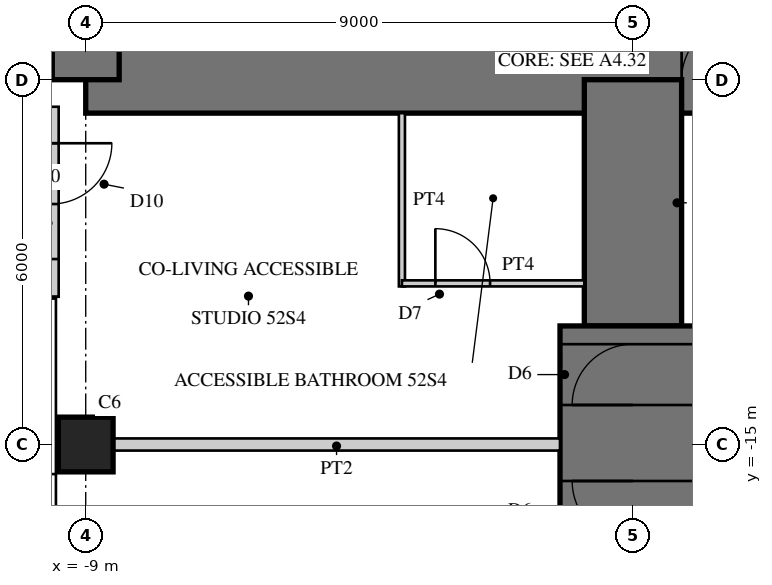
"""IFC4 building model, lengths in metres.
Left out: names, types, materials, properties, quantities, classifications, styles, units other than length and angle.
Written with IfcOpenShell. Run it as: python <this file> out.ifc"""

import sys

from ifc_helpers import new_model, si_unit, direction, frame, frame_2d, origin, origin_2d, place, context, subcontext, project, spatial, rectangle, hollow_rectangle, extrude, element, fill, save


model = new_model("IFC4")
c1 = context("Model", 3, precision=1e-05, world=origin(), true_north=direction((0.0, 1.0)))
c2 = subcontext(c1, "Body", "Model", "MODEL_VIEW")
j1 = project(units=[si_unit("LENGTHUNIT", "METRE"), si_unit("PLANEANGLEUNIT", "RADIAN")], contexts=[c1])
p1 = place(None, origin())
s1 = spatial("IfcSite", under=j1, at=p1, CompositionType="ELEMENT")
p2 = place(p1, origin())
s2 = spatial("IfcBuilding", under=s1, at=p2, CompositionType="ELEMENT")
p3 = place(p2, frame((0.0, 0.0, 206.9)))
s3 = spatial("IfcBuildingStorey", under=s2, at=p3, CompositionType="ELEMENT", Elevation=206.9)
p4 = place(p3, frame((-9.0, -9.0, 0.0), z_axis=(0.0, 0.0, 1.0), x_axis=(1.0, 0.0, 0.0)))
e1 = element("IfcWall", 1, at=p4, inside=s3, PredefinedType="SHEAR", context=c2, shape_type="SweptSolid", body=[
    extrude(rectangle(XDim=18.0, YDim=1.1, at=frame_2d((9.0, 0.0))), origin(), (0.0, 0.0, 1.0), 3.4),
])
p5 = place(p4, frame((9.8, 0.0, 0.0)))
e2 = element("IfcOpeningElement", 2, at=p5, cuts=e1, PredefinedType="OPENING", context=c2, shape_type="SweptSolid", body=[
    extrude(rectangle(XDim=1.0, YDim=2.4, at=frame_2d((0.5, 1.2))), frame((0.0, 0.56, 0.0), z_axis=(0.0, -1.0, 0.0), x_axis=(1.0, 0.0, 0.0)), (0.0, 0.0, 1.0), 1.12),
])
p6 = place(p3, frame((-9.0, 9.0, 0.0), z_axis=(0.0, 0.0, 1.0), x_axis=(0.0, -1.0, 0.0)))
e3 = element("IfcWall", 3, at=p6, inside=s3, PredefinedType="SHEAR", context=c2, shape_type="SweptSolid", body=[
    extrude(rectangle(XDim=18.0, YDim=1.1, at=frame_2d((9.0, 0.0))), origin(), (0.0, 0.0, 1.0), 3.4),
])
p7 = place(p6, frame((9.8, 0.0, 0.0)))
e4 = element("IfcOpeningElement", 4, at=p7, cuts=e3, PredefinedType="OPENING", context=c2, shape_type="SweptSolid", body=[
    extrude(rectangle(XDim=1.0, YDim=2.4, at=frame_2d((0.5, 1.2))), frame((0.0, 0.56, 0.0), z_axis=(0.0, -1.0, 0.0), x_axis=(1.0, 0.0, 0.0)), (0.0, 0.0, 1.0), 1.12),
])
p8 = place(p3, frame((0.0, -9.0, 0.0), z_axis=(0.0, 0.0, 1.0), x_axis=(0.0, -1.0, 0.0)))
e5 = element("IfcWall", 5, at=p8, inside=s3, PredefinedType="SHEAR", context=c2, shape_type="SweptSolid", body=[
    extrude(rectangle(XDim=4.05, YDim=1.6, at=frame_2d((2.025, 0.0))), origin(), (0.0, 0.0, 1.0), 3.4),
])
p9 = place(p3, frame((0.0, -13.05, 0.0), z_axis=(0.0, 0.0, 1.0), x_axis=(0.0, -1.0, 0.0)))
e6 = element("IfcWall", 6, at=p9, inside=s3, PredefinedType="SHEAR", context=c2, shape_type="SweptSolid", body=[
    extrude(rectangle(XDim=13.95, YDim=2.4, at=frame_2d((6.975, 0.0))), origin(), (0.0, 0.0, 1.0), 3.4),
])
p10 = place(p9, frame((0.3, 0.0, 0.0)))
e7 = element("IfcOpeningElement", 7, at=p10, cuts=e6, PredefinedType="OPENING", context=c2, shape_type="SweptSolid", body=[
    extrude(rectangle(XDim=1.0, YDim=2.15, at=frame_2d((0.5, 1.075))), frame((0.0, 1.21, 0.0), z_axis=(0.0, -1.0, 0.0), x_axis=(1.0, 0.0, 0.0)), (0.0, 0.0, 1.0), 2.42),
])
p11 = place(p9, frame((2.55, 0.0, 0.0)))
e8 = element("IfcOpeningElement", 8, at=p11, cuts=e6, PredefinedType="OPENING", context=c2, shape_type="SweptSolid", body=[
    extrude(rectangle(XDim=1.0, YDim=2.15, at=frame_2d((0.5, 1.075))), frame((0.0, 1.21, 0.0), z_axis=(0.0, -1.0, 0.0), x_axis=(1.0, 0.0, 0.0)), (0.0, 0.0, 1.0), 2.42),
])
p12 = place(p9, frame((9.2, 0.0, 0.0)))
e9 = element("IfcOpeningElement", 9, at=p12, cuts=e6, PredefinedType="OPENING", context=c2, shape_type="SweptSolid", body=[
    extrude(rectangle(XDim=1.0, YDim=2.2, at=frame_2d((0.5, 1.1))), frame((0.0, 1.21, 0.0), z_axis=(0.0, -1.0, 0.0), x_axis=(1.0, 0.0, 0.0)), (0.0, 0.0, 1.0), 2.42),
])
p13 = place(p3, frame((-9.0, -15.0, 0.0), z_axis=(0.0, 0.0, 1.0), x_axis=(1.0, 0.0, 0.0)))
e10 = element("IfcColumn", 10, at=p13, inside=s3, PredefinedType="COLUMN", context=c2, shape_type="SweptSolid", body=[
    extrude(rectangle(XDim=0.9, YDim=0.9, at=origin_2d()), origin(), (0.0, 0.0, 1.0), 3.4),
])
p14 = place(p3, frame((-9.57, -9.445, 0.0), z_axis=(0.0, 0.0, 1.0), x_axis=(0.0, -1.0, 0.0)))
e11 = element("IfcWall", 11, at=p14, inside=s3, PredefinedType="SOLIDWALL", context=c2, shape_type="SweptSolid", body=[
    extrude(rectangle(XDim=3.125, YDim=0.25, at=frame_2d((1.562, 0.0))), origin(), (0.0, 0.0, 1.0), 3.22),
])
p15 = place(p14, frame((0.6, 0.0, 0.0)))
e12 = element("IfcOpeningElement", 12, at=p15, cuts=e11, PredefinedType="OPENING", context=c2, shape_type="SweptSolid", body=[
    extrude(rectangle(XDim=1.0, YDim=2.2, at=frame_2d((0.5, 1.1))), frame((0.0, 0.135, 0.0), z_axis=(0.0, -1.0, 0.0), x_axis=(1.0, 0.0, 0.0)), (0.0, 0.0, 1.0), 0.27),
])
p16 = place(p3, frame((-3.8, -9.55, 0.0), z_axis=(0.0, 0.0, 1.0), x_axis=(0.0, -1.0, 0.0)))
e13 = element("IfcWall", 13, at=p16, inside=s3, PredefinedType="PARTITIONING", context=c2, shape_type="SweptSolid", body=[
    extrude(rectangle(XDim=2.85, YDim=0.1, at=frame_2d((1.425, 0.0))), origin(), (0.0, 0.0, 1.0), 3.22),
])
p17 = place(p3, frame((-3.8, -12.35, 0.0), z_axis=(0.0, 0.0, 1.0), x_axis=(1.0, 0.0, 0.0)))
e14 = element("IfcWall", 14, at=p17, inside=s3, PredefinedType="PARTITIONING", context=c2, shape_type="SweptSolid", body=[
    extrude(rectangle(XDim=3.0, YDim=0.1, at=frame_2d((1.5, 0.0))), origin(), (0.0, 0.0, 1.0), 3.22),
])
p18 = place(p17, frame((0.55, 0.0, 0.0)))
e15 = element("IfcOpeningElement", 15, at=p18, cuts=e14, PredefinedType="OPENING", context=c2, shape_type="SweptSolid", body=[
    extrude(rectangle(XDim=0.9, YDim=2.1, at=frame_2d((0.45, 1.05))), frame((0.0, 0.06, 0.0), z_axis=(0.0, -1.0, 0.0), x_axis=(1.0, 0.0, 0.0)), (0.0, 0.0, 1.0), 0.12),
])
p19 = place(p3, frame((-8.55, -15.0, 0.0), z_axis=(0.0, 0.0, 1.0), x_axis=(1.0, 0.0, 0.0)))
e16 = element("IfcWall", 16, at=p19, inside=s3, PredefinedType="SOLIDWALL", context=c2, shape_type="SweptSolid", body=[
    extrude(rectangle(XDim=7.35, YDim=0.2, at=frame_2d((3.675, 0.0))), origin(), (0.0, 0.0, 1.0), 2.47),
])
p20 = place(p15, origin())
e17 = element("IfcDoor", 17, at=p20, inside=s3, OperationType="SINGLE_SWING_LEFT", PredefinedType="DOOR", context=c2, shape_type="SweptSolid", body=[
    extrude(hollow_rectangle(XDim=1.0, YDim=2.2, WallThickness=0.06, at=frame_2d((0.5, 1.1))), frame((0.0, 0.025, 0.0), z_axis=(0.0, -1.0, 0.0), x_axis=(1.0, 0.0, 0.0)), (0.0, 0.0, 1.0), 0.05),
    extrude(rectangle(XDim=0.879, YDim=2.079, at=frame_2d((0.5, 1.1))), frame((0.0, 0.025, 0.0), z_axis=(0.0, -1.0, 0.0), x_axis=(1.0, 0.0, 0.0)), (0.0, 0.0, 1.0), 0.05),
])
fill(e12, e17)
p21 = place(p18, origin())
e18 = element("IfcDoor", 18, at=p21, inside=s3, OperationType="SINGLE_SWING_LEFT", PredefinedType="DOOR", context=c2, shape_type="SweptSolid", body=[
    extrude(rectangle(XDim=0.9, YDim=2.1, at=frame_2d((0.45, 1.05))), frame((0.0, 0.025, 0.0), z_axis=(0.0, -1.0, 0.0), x_axis=(1.0, 0.0, 0.0)), (0.0, 0.0, 1.0), 0.05),
])
fill(e15, e18)
p22 = place(p10, frame((1.0, 0.0, 0.0), z_axis=(0.0, 0.0, 1.0), x_axis=(-1.0, 0.0, 0.0)))
e19 = element("IfcDoor", 19, at=p22, inside=s3, OperationType="SINGLE_SWING_LEFT", PredefinedType="DOOR", context=c2, shape_type="SweptSolid", body=[
    extrude(rectangle(XDim=1.0, YDim=2.15, at=frame_2d((0.5, 1.075))), frame((0.0, 0.025, 0.0), z_axis=(0.0, -1.0, 0.0), x_axis=(1.0, 0.0, 0.0)), (0.0, 0.0, 1.0), 0.05),
])
fill(e7, e19)
p23 = place(p11, frame((1.0, 0.0, 0.0), z_axis=(0.0, 0.0, 1.0), x_axis=(-1.0, 0.0, 0.0)))
e20 = element("IfcDoor", 20, at=p23, inside=s3, OperationType="SINGLE_SWING_RIGHT", PredefinedType="DOOR", context=c2, shape_type="SweptSolid", body=[
    extrude(rectangle(XDim=1.0, YDim=2.15, at=frame_2d((0.5, 1.075))), frame((0.0, 0.025, 0.0), z_axis=(0.0, -1.0, 0.0), x_axis=(1.0, 0.0, 0.0)), (0.0, 0.0, 1.0), 0.05),
])
fill(e8, e20)
p24 = place(p5, origin())
e21 = element("IfcDoor", 21, at=p24, inside=s3, OperationType="SINGLE_SWING_RIGHT", PredefinedType="DOOR", context=c2, shape_type="SweptSolid", body=[
    extrude(rectangle(XDim=1.0, YDim=2.4, at=frame_2d((0.5, 1.2))), frame((0.0, 0.055, 0.0), z_axis=(0.0, -1.0, 0.0), x_axis=(1.0, 0.0, 0.0)), (0.0, 0.0, 1.0), 0.05),
])
fill(e2, e21)
save(model, sys.argv[1])
